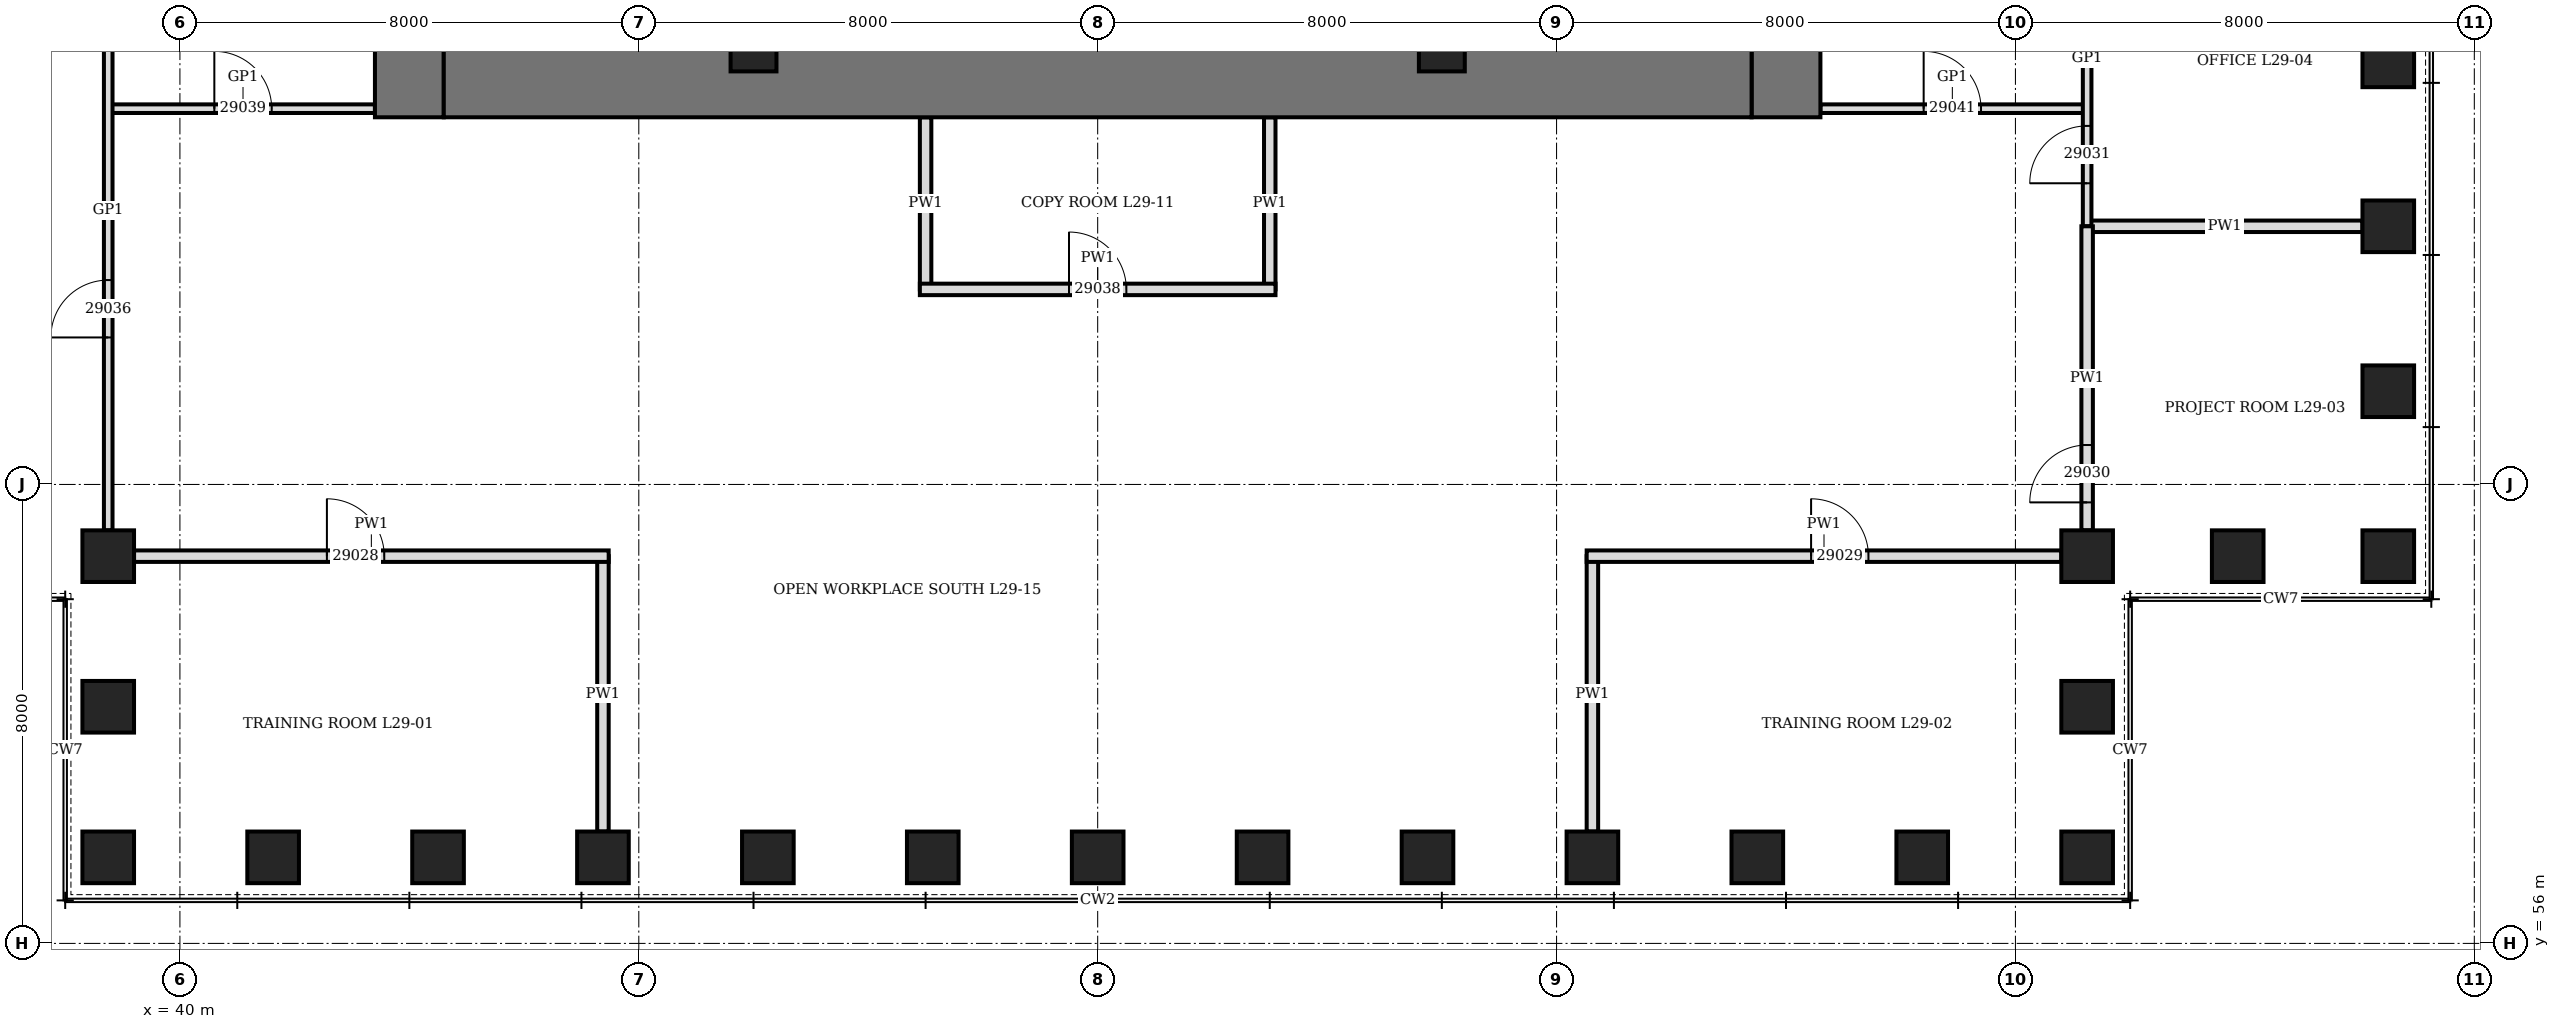
"""IFC4 building model, lengths in metres.
Left out: names, types, materials, properties, quantities, classifications, styles, units other than length and angle.
Written with IfcOpenShell. Run it as: python <this file> out.ifc"""

import sys

from ifc_helpers import new_model, si_unit, direction, frame, frame_2d, origin, origin_2d, place, context, subcontext, project, spatial, rectangle, hollow_rectangle, extrude, element, fill, save


model = new_model("IFC4")
c1 = context("Model", 3, precision=1e-05, world=origin(), true_north=direction((0.0, 1.0)))
c2 = subcontext(c1, "Body", "Model", "MODEL_VIEW")
j1 = project(units=[si_unit("LENGTHUNIT", "METRE"), si_unit("PLANEANGLEUNIT", "RADIAN")], contexts=[c1])
p1 = place(None, origin())
s1 = spatial("IfcSite", under=j1, at=p1, CompositionType="ELEMENT")
p2 = place(p1, origin())
s2 = spatial("IfcBuilding", under=s1, at=p2, CompositionType="ELEMENT")
p3 = place(p2, frame((0.0, 0.0, 133.3)))
s3 = spatial("IfcBuildingStorey", under=s2, at=p3, CompositionType="ELEMENT", Elevation=133.3)
for number, where, z_axis, x_axis in (
    (1, (38.75, 57.5, 0.0), (0.0, 0.0, 1.0), (1.0, 0.0, 0.0)),
    (2, (41.625, 57.5, 0.0), (0.0, 0.0, 1.0), (1.0, 0.0, 0.0)),
    (3, (44.5, 57.5, 0.0), (0.0, 0.0, 1.0), (1.0, 0.0, 0.0)),
    (4, (47.375, 57.5, 0.0), (0.0, 0.0, 1.0), (1.0, 0.0, 0.0)),
    (5, (50.25, 57.5, 0.0), (0.0, 0.0, 1.0), (1.0, 0.0, 0.0)),
    (6, (53.125, 57.5, 0.0), (0.0, 0.0, 1.0), (1.0, 0.0, 0.0)),
    (7, (56.0, 57.5, 0.0), (0.0, 0.0, 1.0), (1.0, 0.0, 0.0)),
    (8, (58.875, 57.5, 0.0), (0.0, 0.0, 1.0), (1.0, 0.0, 0.0)),
    (9, (61.75, 57.5, 0.0), (0.0, 0.0, 1.0), (1.0, 0.0, 0.0)),
    (10, (64.625, 57.5, 0.0), (0.0, 0.0, 1.0), (1.0, 0.0, 0.0)),
    (11, (67.5, 57.5, 0.0), (0.0, 0.0, 1.0), (1.0, 0.0, 0.0)),
    (12, (70.375, 57.5, 0.0), (0.0, 0.0, 1.0), (1.0, 0.0, 0.0)),
    (13, (73.25, 57.5, 0.0), (0.0, 0.0, 1.0), (0.0, 1.0, 0.0)),
    (14, (73.25, 60.125, 0.0), (0.0, 0.0, 1.0), (0.0, 1.0, 0.0)),
    (15, (73.25, 62.75, 0.0), (0.0, 0.0, 1.0), (1.0, 0.0, 0.0)),
    (16, (75.875, 62.75, 0.0), (0.0, 0.0, 1.0), (1.0, 0.0, 0.0)),
    (17, (78.5, 62.75, 0.0), (0.0, 0.0, 1.0), (0.0, 1.0, 0.0)),
    (18, (78.5, 65.625, 0.0), (0.0, 0.0, 1.0), (0.0, 1.0, 0.0)),
    (19, (78.5, 68.5, 0.0), (0.0, 0.0, 1.0), (0.0, 1.0, 0.0)),
    (20, (78.5, 71.375, 0.0), (0.0, 0.0, 1.0), (0.0, 1.0, 0.0)),
    (21, (38.75, 62.75, 0.0), (0.0, 0.0, 1.0), (0.0, 1.0, 0.0)),
    (22, (38.75, 60.125, 0.0), (0.0, 0.0, 1.0), (0.0, 1.0, 0.0)),
):
    element("IfcColumn", number, at=place(p3, frame(where, z_axis=z_axis, x_axis=x_axis)), inside=s3, PredefinedType="COLUMN", context=c2, shape_type="SweptSolid", body=[
        extrude(hollow_rectangle(XDim=0.9, YDim=0.9, WallThickness=0.15, at=origin_2d()), origin(), (0.0, 0.0, 1.0), 4.2),
    ])
p4 = place(p3, frame((44.0, 70.4, 0.0), z_axis=(0.0, 0.0, 1.0), x_axis=(0.0, 1.0, 0.0)))
e23 = element("IfcWall", 23, at=p4, inside=s3, PredefinedType="SHEAR", context=c2, shape_type="SweptSolid", body=[
    extrude(rectangle(XDim=19.2, YDim=1.2, at=frame_2d((9.6, 0.0))), origin(), (0.0, 0.0, 1.0), 4.2),
])
p5 = place(p4, frame((8.6, 0.0, 0.0)))
e24 = element("IfcOpeningElement", 24, at=p5, cuts=e23, PredefinedType="OPENING", context=c2, shape_type="SweptSolid", body=[
    extrude(rectangle(XDim=2.0, YDim=2.4, at=frame_2d((1.0, 1.2))), frame((0.0, 0.61, 0.0), z_axis=(0.0, -1.0, 0.0), x_axis=(1.0, 0.0, 0.0)), (0.0, 0.0, 1.0), 1.22),
])
p6 = place(p3, frame((68.0, 70.4, 0.0), z_axis=(0.0, 0.0, 1.0), x_axis=(0.0, 1.0, 0.0)))
e25 = element("IfcWall", 25, at=p6, inside=s3, PredefinedType="SHEAR", context=c2, shape_type="SweptSolid", body=[
    extrude(rectangle(XDim=19.2, YDim=1.2, at=frame_2d((9.6, 0.0))), origin(), (0.0, 0.0, 1.0), 4.2),
])
p7 = place(p6, frame((8.6, 0.0, 0.0)))
e26 = element("IfcOpeningElement", 26, at=p7, cuts=e25, PredefinedType="OPENING", context=c2, shape_type="SweptSolid", body=[
    extrude(rectangle(XDim=2.0, YDim=2.4, at=frame_2d((1.0, 1.2))), frame((0.0, 0.61, 0.0), z_axis=(0.0, -1.0, 0.0), x_axis=(1.0, 0.0, 0.0)), (0.0, 0.0, 1.0), 1.22),
])
p8 = place(p3, frame((44.6, 71.0, 0.0), z_axis=(0.0, 0.0, 1.0), x_axis=(1.0, 0.0, 0.0)))
e27 = element("IfcWall", 27, at=p8, inside=s3, PredefinedType="SHEAR", context=c2, shape_type="SweptSolid", body=[
    extrude(rectangle(XDim=22.8, YDim=1.2, at=frame_2d((11.4, 0.0))), origin(), (0.0, 0.0, 1.0), 4.2),
])
for number, where, z_axis, x_axis in (
    (28, (50.0, 71.6, 0.0), (0.0, 0.0, 1.0), (1.0, 0.0, 0.0)),
    (29, (62.0, 71.6, 0.0), (0.0, 0.0, 1.0), (1.0, 0.0, 0.0)),
):
    element("IfcColumn", number, at=place(p3, frame(where, z_axis=z_axis, x_axis=x_axis)), inside=s3, PredefinedType="COLUMN", context=c2, shape_type="SweptSolid", body=[
        extrude(hollow_rectangle(XDim=0.8, YDim=0.8, WallThickness=0.1, at=origin_2d()), origin(), (0.0, 0.0, 1.0), 4.2),
    ])
for number, where, z_axis, x_axis in (
    (30, (47.375, 57.95, 0.0), (0.0, 0.0, 1.0), (0.0, 1.0, 0.0)),
    (31, (64.625, 57.95, 0.0), (0.0, 0.0, 1.0), (0.0, 1.0, 0.0)),
):
    element("IfcWall", number, at=place(p3, frame(where, z_axis=z_axis, x_axis=x_axis)), inside=s3, PredefinedType="PARTITIONING", context=c2, shape_type="SweptSolid", body=[
        extrude(rectangle(XDim=4.8, YDim=0.2, at=frame_2d((2.4, 0.0))), origin(), (0.0, 0.0, 1.0), 3.278),
    ])
p9 = place(p3, frame((73.25, 68.5, 0.0), z_axis=(0.0, 0.0, 1.0), x_axis=(1.0, 0.0, 0.0)))
e32 = element("IfcWall", 32, at=p9, inside=s3, PredefinedType="PARTITIONING", context=c2, shape_type="SweptSolid", body=[
    extrude(rectangle(XDim=4.8, YDim=0.2, at=frame_2d((2.4, 0.0))), origin(), (0.0, 0.0, 1.0), 3.428),
])
for number, where, z_axis, x_axis in (
    (33, (53.0, 67.4, 0.0), (0.0, 0.0, 1.0), (0.0, 1.0, 0.0)),
    (34, (59.0, 67.4, 0.0), (0.0, 0.0, 1.0), (0.0, 1.0, 0.0)),
):
    element("IfcWall", number, at=place(p3, frame(where, z_axis=z_axis, x_axis=x_axis)), inside=s3, PredefinedType="PARTITIONING", context=c2, shape_type="SweptSolid", body=[
        extrude(rectangle(XDim=3.0, YDim=0.2, at=frame_2d((1.5, 0.0))), origin(), (0.0, 0.0, 1.0), 3.278),
    ])
p10 = place(p3, frame((39.2, 62.75, 0.0), z_axis=(0.0, 0.0, 1.0), x_axis=(1.0, 0.0, 0.0)))
e35 = element("IfcWall", 35, at=p10, inside=s3, PredefinedType="PARTITIONING", context=c2, shape_type="SweptSolid", body=[
    extrude(rectangle(XDim=8.275, YDim=0.2, at=frame_2d((4.138, 0.0))), origin(), (0.0, 0.0, 1.0), 4.04),
])
p11 = place(p10, frame((3.363, 0.0, 0.0)))
e36 = element("IfcOpeningElement", 36, at=p11, cuts=e35, PredefinedType="OPENING", context=c2, shape_type="SweptSolid", body=[
    extrude(rectangle(XDim=1.0, YDim=2.1, at=frame_2d((0.5, 1.05))), frame((0.0, 0.11, 0.0), z_axis=(0.0, -1.0, 0.0), x_axis=(1.0, 0.0, 0.0)), (0.0, 0.0, 1.0), 0.22),
])
p12 = place(p3, frame((64.525, 62.75, 0.0), z_axis=(0.0, 0.0, 1.0), x_axis=(1.0, 0.0, 0.0)))
e37 = element("IfcWall", 37, at=p12, inside=s3, PredefinedType="PARTITIONING", context=c2, shape_type="SweptSolid", body=[
    extrude(rectangle(XDim=8.275, YDim=0.2, at=frame_2d((4.138, 0.0))), origin(), (0.0, 0.0, 1.0), 4.04),
])
p13 = place(p12, frame((3.913, 0.0, 0.0)))
e38 = element("IfcOpeningElement", 38, at=p13, cuts=e37, PredefinedType="OPENING", context=c2, shape_type="SweptSolid", body=[
    extrude(rectangle(XDim=1.0, YDim=2.1, at=frame_2d((0.5, 1.05))), frame((0.0, 0.11, 0.0), z_axis=(0.0, -1.0, 0.0), x_axis=(1.0, 0.0, 0.0)), (0.0, 0.0, 1.0), 0.22),
])
p14 = place(p3, frame((52.9, 67.4, 0.0), z_axis=(0.0, 0.0, 1.0), x_axis=(1.0, 0.0, 0.0)))
e39 = element("IfcWall", 39, at=p14, inside=s3, PredefinedType="PARTITIONING", context=c2, shape_type="SweptSolid", body=[
    extrude(rectangle(XDim=6.2, YDim=0.2, at=frame_2d((3.1, 0.0))), origin(), (0.0, 0.0, 1.0), 4.04),
])
p15 = place(p14, frame((2.6, 0.0, 0.0)))
e40 = element("IfcOpeningElement", 40, at=p15, cuts=e39, PredefinedType="OPENING", context=c2, shape_type="SweptSolid", body=[
    extrude(rectangle(XDim=1.0, YDim=2.1, at=frame_2d((0.5, 1.05))), frame((0.0, 0.11, 0.0), z_axis=(0.0, -1.0, 0.0), x_axis=(1.0, 0.0, 0.0)), (0.0, 0.0, 1.0), 0.22),
])
p16 = place(p3, frame((38.8, 70.55, 0.0), z_axis=(0.0, 0.0, 1.0), x_axis=(1.0, 0.0, 0.0)))
e41 = element("IfcWall", 41, at=p16, inside=s3, PredefinedType="PARTITIONING", context=c2, shape_type="SweptSolid", body=[
    extrude(rectangle(XDim=4.6, YDim=0.15, at=frame_2d((2.3, 0.0))), origin(), (0.0, 0.0, 1.0), 4.04),
])
p17 = place(p16, frame((1.8, 0.0, 0.0)))
e42 = element("IfcOpeningElement", 42, at=p17, cuts=e41, PredefinedType="OPENING", context=c2, shape_type="SweptSolid", body=[
    extrude(rectangle(XDim=1.0, YDim=2.4, at=frame_2d((0.5, 1.2))), frame((0.0, 0.085, 0.0), z_axis=(0.0, -1.0, 0.0), x_axis=(1.0, 0.0, 0.0)), (0.0, 0.0, 1.0), 0.17),
])
p18 = place(p3, frame((68.6, 70.55, 0.0), z_axis=(0.0, 0.0, 1.0), x_axis=(1.0, 0.0, 0.0)))
e43 = element("IfcWall", 43, at=p18, inside=s3, PredefinedType="PARTITIONING", context=c2, shape_type="SweptSolid", body=[
    extrude(rectangle(XDim=4.6, YDim=0.15, at=frame_2d((2.3, 0.0))), origin(), (0.0, 0.0, 1.0), 4.04),
])
p19 = place(p18, frame((1.8, 0.0, 0.0)))
e44 = element("IfcOpeningElement", 44, at=p19, cuts=e43, PredefinedType="OPENING", context=c2, shape_type="SweptSolid", body=[
    extrude(rectangle(XDim=1.0, YDim=2.4, at=frame_2d((0.5, 1.2))), frame((0.0, 0.085, 0.0), z_axis=(0.0, -1.0, 0.0), x_axis=(1.0, 0.0, 0.0)), (0.0, 0.0, 1.0), 0.17),
])
p20 = place(p3, frame((38.75, 63.2, 0.0), z_axis=(0.0, 0.0, 1.0), x_axis=(0.0, 1.0, 0.0)))
e45 = element("IfcWall", 45, at=p20, inside=s3, PredefinedType="PARTITIONING", context=c2, shape_type="SweptSolid", body=[
    extrude(rectangle(XDim=11.15, YDim=0.15, at=frame_2d((5.575, 0.0))), origin(), (0.0, 0.0, 1.0), 4.04),
])
p21 = place(p20, frame((3.363, 0.0, 0.0)))
e46 = element("IfcOpeningElement", 46, at=p21, cuts=e45, PredefinedType="OPENING", context=c2, shape_type="SweptSolid", body=[
    extrude(rectangle(XDim=1.0, YDim=2.4, at=frame_2d((0.5, 1.2))), frame((0.0, 0.085, 0.0), z_axis=(0.0, -1.0, 0.0), x_axis=(1.0, 0.0, 0.0)), (0.0, 0.0, 1.0), 0.17),
])
p22 = place(p3, frame((73.25, 68.5, 0.0), z_axis=(0.0, 0.0, 1.0), x_axis=(0.0, 1.0, 0.0)))
e47 = element("IfcWall", 47, at=p22, inside=s3, PredefinedType="PARTITIONING", context=c2, shape_type="SweptSolid", body=[
    extrude(rectangle(XDim=5.85, YDim=0.15, at=frame_2d((2.925, 0.0))), origin(), (0.0, 0.0, 1.0), 4.04),
])
p23 = place(p22, frame((0.75, 0.0, 0.0)))
e48 = element("IfcOpeningElement", 48, at=p23, cuts=e47, PredefinedType="OPENING", context=c2, shape_type="SweptSolid", body=[
    extrude(rectangle(XDim=1.0, YDim=2.1, at=frame_2d((0.5, 1.05))), frame((0.0, 0.085, 0.0), z_axis=(0.0, -1.0, 0.0), x_axis=(1.0, 0.0, 0.0)), (0.0, 0.0, 1.0), 0.17),
])
p24 = place(p3, frame((73.25, 63.2, 0.0), z_axis=(0.0, 0.0, 1.0), x_axis=(0.0, 1.0, 0.0)))
e49 = element("IfcWall", 49, at=p24, inside=s3, PredefinedType="PARTITIONING", context=c2, shape_type="SweptSolid", body=[
    extrude(rectangle(XDim=5.3, YDim=0.2, at=frame_2d((2.65, 0.0))), origin(), (0.0, 0.0, 1.0), 4.04),
])
p25 = place(p24, frame((0.488, 0.0, 0.0)))
e50 = element("IfcOpeningElement", 50, at=p25, cuts=e49, PredefinedType="OPENING", context=c2, shape_type="SweptSolid", body=[
    extrude(rectangle(XDim=1.0, YDim=2.1, at=frame_2d((0.5, 1.05))), frame((0.0, 0.11, 0.0), z_axis=(0.0, -1.0, 0.0), x_axis=(1.0, 0.0, 0.0)), (0.0, 0.0, 1.0), 0.22),
])
p26 = place(p11, origin())
e51 = element("IfcDoor", 51, at=p26, inside=s3, OperationType="SINGLE_SWING_LEFT", PredefinedType="DOOR", context=c2, shape_type="SweptSolid", body=[
    extrude(rectangle(XDim=1.0, YDim=2.1, at=frame_2d((0.5, 1.05))), frame((0.0, 0.1, 0.0), z_axis=(0.0, -1.0, 0.0), x_axis=(1.0, 0.0, 0.0)), (0.0, 0.0, 1.0), 0.199),
])
fill(e36, e51)
p27 = place(p13, origin())
e52 = element("IfcDoor", 52, at=p27, inside=s3, OperationType="SINGLE_SWING_LEFT", PredefinedType="DOOR", context=c2, shape_type="SweptSolid", body=[
    extrude(rectangle(XDim=1.0, YDim=2.1, at=frame_2d((0.5, 1.05))), frame((0.0, 0.1, 0.0), z_axis=(0.0, -1.0, 0.0), x_axis=(1.0, 0.0, 0.0)), (0.0, 0.0, 1.0), 0.199),
])
fill(e38, e52)
p28 = place(p25, origin())
e53 = element("IfcDoor", 53, at=p28, inside=s3, OperationType="SINGLE_SWING_LEFT", PredefinedType="DOOR", context=c2, shape_type="SweptSolid", body=[
    extrude(rectangle(XDim=1.0, YDim=2.1, at=frame_2d((0.5, 1.05))), frame((0.0, 0.1, 0.0), z_axis=(0.0, -1.0, 0.0), x_axis=(1.0, 0.0, 0.0)), (0.0, 0.0, 1.0), 0.199),
])
fill(e50, e53)
p29 = place(p23, origin())
e54 = element("IfcDoor", 54, at=p29, inside=s3, OperationType="SINGLE_SWING_LEFT", PredefinedType="DOOR", context=c2, shape_type="SweptSolid", body=[
    extrude(rectangle(XDim=1.0, YDim=2.1, at=frame_2d((0.5, 1.05))), frame((0.0, 0.075, 0.0), z_axis=(0.0, -1.0, 0.0), x_axis=(1.0, 0.0, 0.0)), (0.0, 0.0, 1.0), 0.149),
])
fill(e48, e54)
p30 = place(p21, origin())
e55 = element("IfcDoor", 55, at=p30, inside=s3, OperationType="SINGLE_SWING_RIGHT", PredefinedType="DOOR", context=c2, shape_type="SweptSolid", body=[
    extrude(rectangle(XDim=1.0, YDim=2.4, at=frame_2d((0.5, 1.2))), frame((0.0, 0.075, 0.0), z_axis=(0.0, -1.0, 0.0), x_axis=(1.0, 0.0, 0.0)), (0.0, 0.0, 1.0), 0.149),
])
fill(e46, e55)
p31 = place(p15, origin())
e56 = element("IfcDoor", 56, at=p31, inside=s3, OperationType="SINGLE_SWING_LEFT", PredefinedType="DOOR", context=c2, shape_type="SweptSolid", body=[
    extrude(rectangle(XDim=1.0, YDim=2.1, at=frame_2d((0.5, 1.05))), frame((0.0, 0.1, 0.0), z_axis=(0.0, -1.0, 0.0), x_axis=(1.0, 0.0, 0.0)), (0.0, 0.0, 1.0), 0.199),
])
fill(e40, e56)
p32 = place(p17, origin())
e57 = element("IfcDoor", 57, at=p32, inside=s3, OperationType="SINGLE_SWING_RIGHT", PredefinedType="DOOR", context=c2, shape_type="SweptSolid", body=[
    extrude(rectangle(XDim=1.0, YDim=2.4, at=frame_2d((0.5, 1.2))), frame((0.0, 0.075, 0.0), z_axis=(0.0, -1.0, 0.0), x_axis=(1.0, 0.0, 0.0)), (0.0, 0.0, 1.0), 0.149),
])
fill(e42, e57)
p33 = place(p19, origin())
e58 = element("IfcDoor", 58, at=p33, inside=s3, OperationType="SINGLE_SWING_RIGHT", PredefinedType="DOOR", context=c2, shape_type="SweptSolid", body=[
    extrude(rectangle(XDim=1.0, YDim=2.4, at=frame_2d((0.5, 1.2))), frame((0.0, 0.075, 0.0), z_axis=(0.0, -1.0, 0.0), x_axis=(1.0, 0.0, 0.0)), (0.0, 0.0, 1.0), 0.149),
])
fill(e44, e58)
save(model, sys.argv[1])
